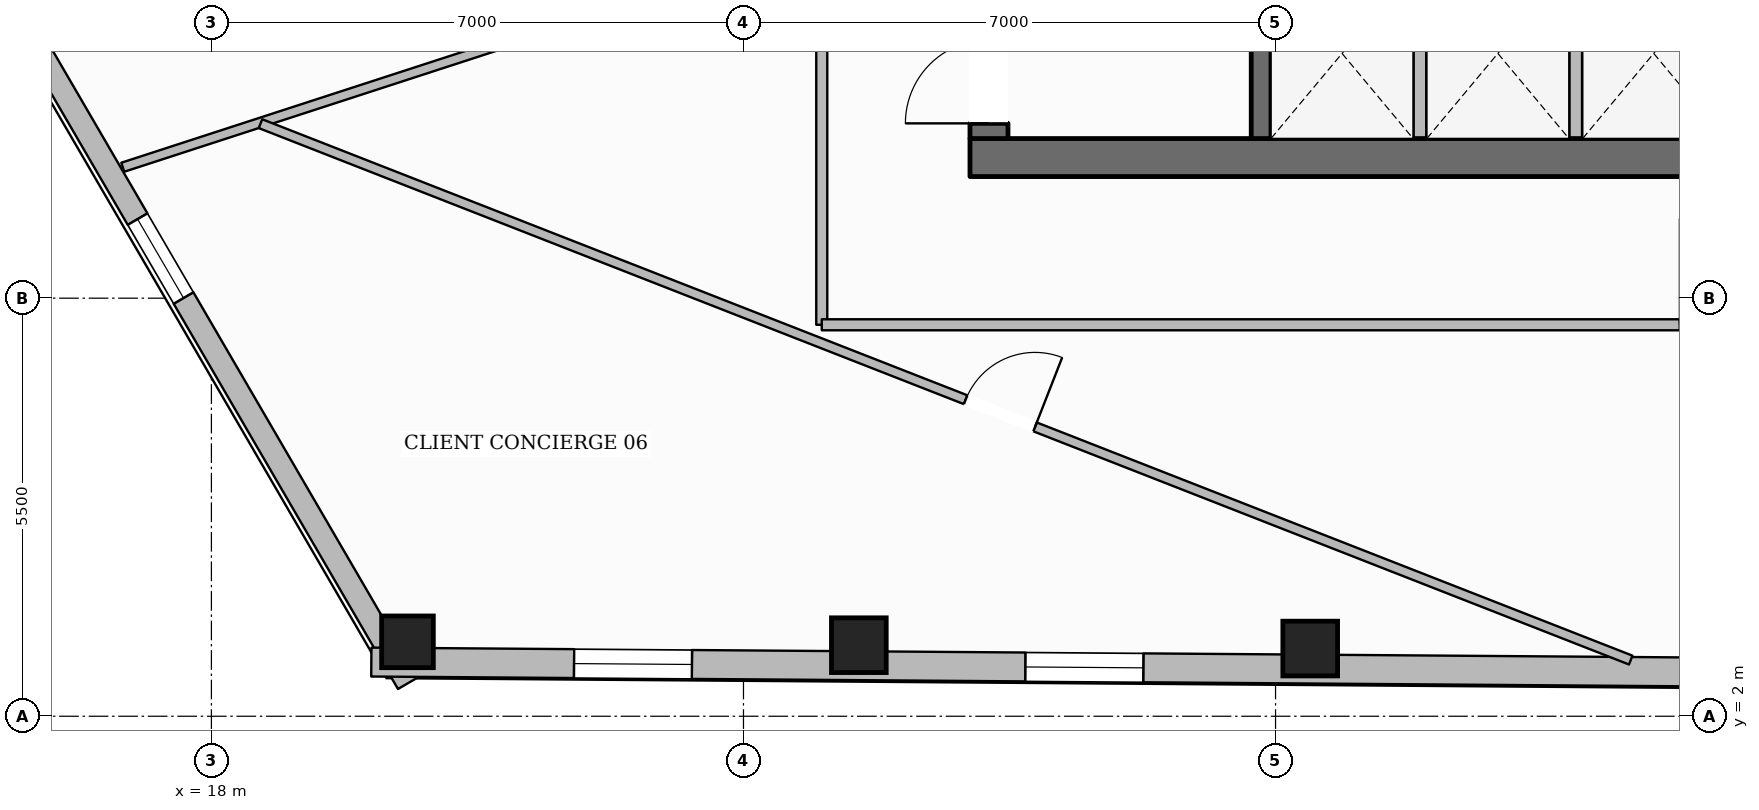
"""IFC4 building model, lengths in metres.
Left out: names, types, materials, properties, quantities, classifications, styles, units other than length and angle.
Written with IfcOpenShell. Run it as: python <this file> out.ifc"""

import sys

from ifc_helpers import new_model, si_unit, direction, frame, frame_2d, origin, origin_2d, place, context, subcontext, project, spatial, rectangle, hollow_rectangle, extrude, element, fill, save


model = new_model("IFC4")
c1 = context("Model", 3, precision=1e-05, world=origin(), true_north=direction((0.0, 1.0)))
c2 = subcontext(c1, "Body", "Model", "MODEL_VIEW")
j1 = project(units=[si_unit("LENGTHUNIT", "METRE"), si_unit("PLANEANGLEUNIT", "RADIAN")], contexts=[c1])
p1 = place(None, origin())
s1 = spatial("IfcSite", under=j1, at=p1, CompositionType="ELEMENT")
p2 = place(p1, origin())
s2 = spatial("IfcBuilding", under=s1, at=p2, CompositionType="ELEMENT")
p3 = place(p2, frame((0.0, 0.0, 116.3)))
s3 = spatial("IfcBuildingStorey", under=s2, at=p3, CompositionType="ELEMENT", Elevation=116.3)
p4 = place(p3, frame((27.98, 9.35, 0.0), z_axis=(0.0, 0.0, 1.0), x_axis=(1.0, 0.0, 0.0)))
e1 = element("IfcWall", 1, at=p4, inside=s3, PredefinedType="SOLIDWALL", context=c2, shape_type="SweptSolid", body=[
    extrude(rectangle(XDim=20.04, YDim=0.5, at=frame_2d((10.02, 0.0))), origin(), (0.0, 0.0, 1.0), 3.6),
])
p5 = place(p4, frame((10.52, 0.0, 0.0)))
e2 = element("IfcOpeningElement", 2, at=p5, cuts=e1, PredefinedType="OPENING", context=c2, shape_type="SweptSolid", body=[
    extrude(rectangle(XDim=1.4, YDim=2.2, at=frame_2d((0.7, 1.1))), frame((0.0, 0.26, 0.0), z_axis=(0.0, -1.0, 0.0), x_axis=(1.0, 0.0, 0.0)), (0.0, 0.0, 1.0), 0.52),
])
p6 = place(p3, frame((28.23, 9.6, 0.0), z_axis=(0.0, 0.0, 1.0), x_axis=(0.0, 1.0, 0.0)))
e3 = element("IfcWall", 3, at=p6, inside=s3, PredefinedType="SOLIDWALL", context=c2, shape_type="SweptSolid", body=[
    extrude(rectangle(XDim=13.0, YDim=0.5, at=frame_2d((6.5, 0.0))), origin(), (0.0, 0.0, 1.0), 3.6),
])
p7 = place(p6, frame((0.2, 0.0, 0.0)))
e4 = element("IfcOpeningElement", 4, at=p7, cuts=e3, PredefinedType="OPENING", context=c2, shape_type="SweptSolid", body=[
    extrude(rectangle(XDim=1.1, YDim=2.15, at=frame_2d((0.55, 1.075))), frame((0.0, 0.26, 0.0), z_axis=(0.0, -1.0, 0.0), x_axis=(1.0, 0.0, 0.0)), (0.0, 0.0, 1.0), 0.52),
])
p8 = place(p6, frame((8.4, 0.0, 0.0)))
e5 = element("IfcOpeningElement", 5, at=p8, cuts=e3, PredefinedType="OPENING", context=c2, shape_type="SweptSolid", body=[
    extrude(rectangle(XDim=0.9, YDim=2.1, at=frame_2d((0.45, 1.05))), frame((0.0, 0.26, 0.0), z_axis=(0.0, -1.0, 0.0), x_axis=(1.0, 0.0, 0.0)), (0.0, 0.0, 1.0), 0.52),
])
p9 = place(p3, frame((31.81, 9.6, 0.0), z_axis=(0.0, 0.0, 1.0), x_axis=(0.0, 1.0, 0.0)))
e6 = element("IfcWall", 6, at=p9, inside=s3, PredefinedType="SHEAR", context=c2, shape_type="SweptSolid", body=[
    extrude(rectangle(XDim=13.0, YDim=0.26, at=frame_2d((6.5, 0.0))), origin(), (0.0, 0.0, 1.0), 3.6),
])
p10 = place(p9, frame((10.925, 0.0, 0.0)))
e7 = element("IfcOpeningElement", 7, at=p10, cuts=e6, PredefinedType="OPENING", context=c2, shape_type="SweptSolid", body=[
    extrude(rectangle(XDim=1.25, YDim=2.25, at=frame_2d((0.625, 1.125))), frame((0.0, 0.14, 0.0), z_axis=(0.0, -1.0, 0.0), x_axis=(1.0, 0.0, 0.0)), (0.0, 0.0, 1.0), 0.28),
])
p11 = place(p3, frame((20.58, 2.979, 0.0), z_axis=(0.0, 0.0, 1.0), x_axis=(1.0, 0.0, 0.0)))
e8 = element("IfcColumn", 8, at=p11, inside=s3, PredefinedType="COLUMN", context=c2, shape_type="SweptSolid", body=[
    extrude(hollow_rectangle(XDim=0.68, YDim=0.68, WallThickness=0.03, at=origin_2d()), origin(), (0.0, 0.0, 1.0), 3.6),
])
for number, where, z_axis, x_axis in (
    (9, (26.518, 2.935, 0.0), (0.0, 0.0, 1.0), (1.0, 0.0, 0.0)),
    (10, (32.456, 2.89, 0.0), (0.0, 0.0, 1.0), (1.0, 0.0, 0.0)),
):
    element("IfcColumn", number, at=place(p3, frame(where, z_axis=z_axis, x_axis=x_axis)), inside=s3, PredefinedType="COLUMN", context=c2, shape_type="SweptSolid", body=[
        extrude(hollow_rectangle(XDim=0.72, YDim=0.72, WallThickness=0.032, at=origin_2d()), origin(), (0.0, 0.0, 1.0), 3.6),
    ])
p12 = place(p3, frame((20.584, 2.434, 0.0), z_axis=(0.0, 0.0, 1.0), x_axis=(-0.503212324208, 0.864162806863, 0.0)))
e11 = element("IfcWall", 11, at=p12, inside=s3, PredefinedType="STANDARD", context=c2, shape_type="SweptSolid", body=[
    extrude(rectangle(XDim=12.931, YDim=0.3, at=frame_2d((6.466, 0.0))), origin(), (0.0, 0.0, 1.0), 3.059),
])
p13 = place(p12, frame((5.865, 0.0, 0.65)))
e12 = element("IfcOpeningElement", 12, at=p13, cuts=e11, PredefinedType="OPENING", context=c2, shape_type="SweptSolid", body=[
    extrude(rectangle(XDim=1.2, YDim=1.7, at=frame_2d((0.6, 0.85))), frame((0.0, 0.16, 0.0), z_axis=(0.0, -1.0, 0.0), x_axis=(1.0, 0.0, 0.0)), (0.0, 0.0, 1.0), 0.32),
])
p14 = place(p3, frame((56.688, 2.44, 0.0), z_axis=(0.0, 0.0, 1.0), x_axis=(-0.999972168694, 0.007460686059, 0.0)))
e13 = element("IfcWall", 13, at=p14, inside=s3, PredefinedType="STANDARD", context=c2, shape_type="SweptSolid", body=[
    extrude(rectangle(XDim=36.585, YDim=0.38, at=frame_2d((18.292, 0.0))), origin(), (0.0, 0.0, 1.0), 3.059),
])
p15 = place(p14, frame((32.367, 0.0, 0.65)))
e14 = element("IfcOpeningElement", 14, at=p15, cuts=e13, PredefinedType="OPENING", context=c2, shape_type="SweptSolid", body=[
    extrude(rectangle(XDim=1.55, YDim=1.75, at=frame_2d((0.775, 0.875))), frame((0.0, 0.2, 0.0), z_axis=(0.0, -1.0, 0.0), x_axis=(1.0, 0.0, 0.0)), (0.0, 0.0, 1.0), 0.4),
])
p16 = place(p14, frame((26.429, 0.0, 0.65)))
e15 = element("IfcOpeningElement", 15, at=p16, cuts=e13, PredefinedType="OPENING", context=c2, shape_type="SweptSolid", body=[
    extrude(rectangle(XDim=1.55, YDim=1.75, at=frame_2d((0.775, 0.875))), frame((0.0, 0.2, 0.0), z_axis=(0.0, -1.0, 0.0), x_axis=(1.0, 0.0, 0.0)), (0.0, 0.0, 1.0), 0.4),
])
p17 = place(p14, frame((14.552, 0.0, 0.65)))
e16 = element("IfcOpeningElement", 16, at=p17, cuts=e13, PredefinedType="OPENING", context=c2, shape_type="SweptSolid", body=[
    extrude(rectangle(XDim=1.55, YDim=1.75, at=frame_2d((0.775, 0.875))), frame((0.0, 0.2, 0.0), z_axis=(0.0, -1.0, 0.0), x_axis=(1.0, 0.0, 0.0)), (0.0, 0.0, 1.0), 0.4),
])
p18 = place(p14, frame((8.613, 0.0, 0.65)))
e17 = element("IfcOpeningElement", 17, at=p18, cuts=e13, PredefinedType="OPENING", context=c2, shape_type="SweptSolid", body=[
    extrude(rectangle(XDim=1.55, YDim=1.75, at=frame_2d((0.775, 0.875))), frame((0.0, 0.2, 0.0), z_axis=(0.0, -1.0, 0.0), x_axis=(1.0, 0.0, 0.0)), (0.0, 0.0, 1.0), 0.4),
])
p19 = place(p14, frame((2.675, 0.0, 0.65)))
e18 = element("IfcOpeningElement", 18, at=p19, cuts=e13, PredefinedType="OPENING", context=c2, shape_type="SweptSolid", body=[
    extrude(rectangle(XDim=1.55, YDim=1.75, at=frame_2d((0.775, 0.875))), frame((0.0, 0.2, 0.0), z_axis=(0.0, -1.0, 0.0), x_axis=(1.0, 0.0, 0.0)), (0.0, 0.0, 1.0), 0.4),
])
for number, where, z_axis, x_axis in (
    (19, (33.9, 9.55, 0.0), (0.0, 0.0, 1.0), (0.0, 1.0, 0.0)),
    (20, (35.95, 9.55, 0.0), (0.0, 0.0, 1.0), (0.0, 1.0, 0.0)),
):
    element("IfcWall", number, at=place(p3, frame(where, z_axis=z_axis, x_axis=x_axis)), inside=s3, PredefinedType="PARTITIONING", context=c2, shape_type="SweptSolid", body=[
        extrude(rectangle(XDim=2.29, YDim=0.165, at=frame_2d((1.145, 0.0))), origin(), (0.0, 0.0, 1.0), 3.6),
    ])
p20 = place(p3, frame((26.03, 25.05, 0.0), z_axis=(0.0, 0.0, 1.0), x_axis=(0.0, -1.0, 0.0)))
e21 = element("IfcWall", 21, at=p20, inside=s3, PredefinedType="PARTITIONING", context=c2, shape_type="SweptSolid", body=[
    extrude(rectangle(XDim=17.9, YDim=0.145, at=frame_2d((8.95, 0.0))), origin(), (0.0, 0.0, 1.0), 3.288),
])
p21 = place(p20, frame((4.717, 0.0, 0.0)))
e22 = element("IfcOpeningElement", 22, at=p21, cuts=e21, PredefinedType="OPENING", context=c2, shape_type="SweptSolid", body=[
    extrude(rectangle(XDim=1.4, YDim=2.2, at=frame_2d((0.7, 1.1))), frame((0.0, 0.083, 0.0), z_axis=(0.0, -1.0, 0.0), x_axis=(1.0, 0.0, 0.0)), (0.0, 0.0, 1.0), 0.165),
])
p22 = place(p3, frame((26.03, 7.15, 0.0), z_axis=(0.0, 0.0, 1.0), x_axis=(1.0, 0.0, 0.0)))
e23 = element("IfcWall", 23, at=p22, inside=s3, PredefinedType="PARTITIONING", context=c2, shape_type="SweptSolid", body=[
    extrude(rectangle(XDim=23.94, YDim=0.145, at=frame_2d((11.97, 0.0))), origin(), (0.0, 0.0, 1.0), 3.6),
])
p23 = place(p22, frame((11.29, 0.0, 0.0)))
e24 = element("IfcOpeningElement", 24, at=p23, cuts=e23, PredefinedType="OPENING", context=c2, shape_type="SweptSolid", body=[
    extrude(rectangle(XDim=1.4, YDim=2.2, at=frame_2d((0.7, 1.1))), frame((0.0, 0.083, 0.0), z_axis=(0.0, -1.0, 0.0), x_axis=(1.0, 0.0, 0.0)), (0.0, 0.0, 1.0), 0.165),
])
p24 = place(p3, frame((25.949, 12.185, 0.0), z_axis=(0.0, 0.0, 1.0), x_axis=(-0.951052973062, -0.309027899113, 0.0)))
e25 = element("IfcWall", 25, at=p24, inside=s3, PredefinedType="PARTITIONING", context=c2, shape_type="SweptSolid", body=[
    extrude(rectangle(XDim=9.585, YDim=0.125, at=frame_2d((4.792, 0.0))), origin(), (0.0, 0.0, 1.0), 3.6),
])
p25 = place(p3, frame((18.646, 9.796, 0.0), z_axis=(0.0, 0.0, 1.0), x_axis=(0.931196254874, -0.364518223014, 0.0)))
e26 = element("IfcWall", 26, at=p25, inside=s3, PredefinedType="PARTITIONING", context=c2, shape_type="SweptSolid", body=[
    extrude(rectangle(XDim=19.359, YDim=0.125, at=frame_2d((9.679, 0.0))), origin(), (0.0, 0.0, 1.0), 3.062),
])
p26 = place(p25, frame((9.963, 0.0, 0.0)))
e27 = element("IfcOpeningElement", 27, at=p26, cuts=e26, PredefinedType="OPENING", context=c2, shape_type="SweptSolid", body=[
    extrude(rectangle(XDim=0.98, YDim=2.15, at=frame_2d((0.49, 1.075))), frame((0.0, 0.073, 0.0), z_axis=(0.0, -1.0, 0.0), x_axis=(1.0, 0.0, 0.0)), (0.0, 0.0, 1.0), 0.145),
])
p27 = place(p15, origin())
e28 = element("IfcWindow", 28, at=p27, inside=s3, PartitioningType="SINGLE_PANEL", PredefinedType="WINDOW", context=c2, shape_type="SweptSolid", body=[
    extrude(rectangle(XDim=1.55, YDim=1.75, at=frame_2d((0.775, 0.875))), frame((0.0, 0.03, 0.0), z_axis=(0.0, -1.0, 0.0), x_axis=(1.0, 0.0, 0.0)), (0.0, 0.0, 1.0), 0.06),
])
fill(e14, e28)
p28 = place(p16, origin())
e29 = element("IfcWindow", 29, at=p28, inside=s3, PartitioningType="SINGLE_PANEL", PredefinedType="WINDOW", context=c2, shape_type="SweptSolid", body=[
    extrude(rectangle(XDim=1.55, YDim=1.75, at=frame_2d((0.775, 0.875))), frame((0.0, 0.03, 0.0), z_axis=(0.0, -1.0, 0.0), x_axis=(1.0, 0.0, 0.0)), (0.0, 0.0, 1.0), 0.06),
])
fill(e15, e29)
p29 = place(p13, origin())
e30 = element("IfcWindow", 30, at=p29, inside=s3, PartitioningType="SINGLE_PANEL", PredefinedType="WINDOW", context=c2, shape_type="SweptSolid", body=[
    extrude(rectangle(XDim=1.2, YDim=1.7, at=frame_2d((0.6, 0.85))), frame((0.0, 0.03, 0.0), z_axis=(0.0, -1.0, 0.0), x_axis=(1.0, 0.0, 0.0)), (0.0, 0.0, 1.0), 0.06),
])
fill(e12, e30)
p30 = place(p7, origin())
e31 = element("IfcDoor", 31, at=p30, inside=s3, OperationType="SINGLE_SWING_LEFT", PredefinedType="DOOR", context=c2, shape_type="SweptSolid", body=[
    extrude(rectangle(XDim=1.1, YDim=2.15, at=frame_2d((0.55, 1.075))), frame((0.0, 0.025, 0.0), z_axis=(0.0, -1.0, 0.0), x_axis=(1.0, 0.0, 0.0)), (0.0, 0.0, 1.0), 0.05),
])
fill(e4, e31)
p31 = place(p23, origin())
e32 = element("IfcDoor", 32, at=p31, inside=s3, OperationType="SINGLE_SWING_LEFT", PredefinedType="DOOR", context=c2, shape_type="SweptSolid", body=[
    extrude(rectangle(XDim=1.4, YDim=2.2, at=frame_2d((0.7, 1.1))), frame((0.0, 0.025, 0.0), z_axis=(0.0, -1.0, 0.0), x_axis=(1.0, 0.0, 0.0)), (0.0, 0.0, 1.0), 0.05),
])
fill(e24, e32)
p32 = place(p26, origin())
e33 = element("IfcDoor", 33, at=p32, inside=s3, OperationType="SINGLE_SWING_RIGHT", PredefinedType="DOOR", context=c2, shape_type="SweptSolid", body=[
    extrude(rectangle(XDim=0.98, YDim=2.15, at=frame_2d((0.49, 1.075))), frame((0.0, 0.025, 0.0), z_axis=(0.0, -1.0, 0.0), x_axis=(1.0, 0.0, 0.0)), (0.0, 0.0, 1.0), 0.05),
])
fill(e27, e33)
save(model, sys.argv[1])
